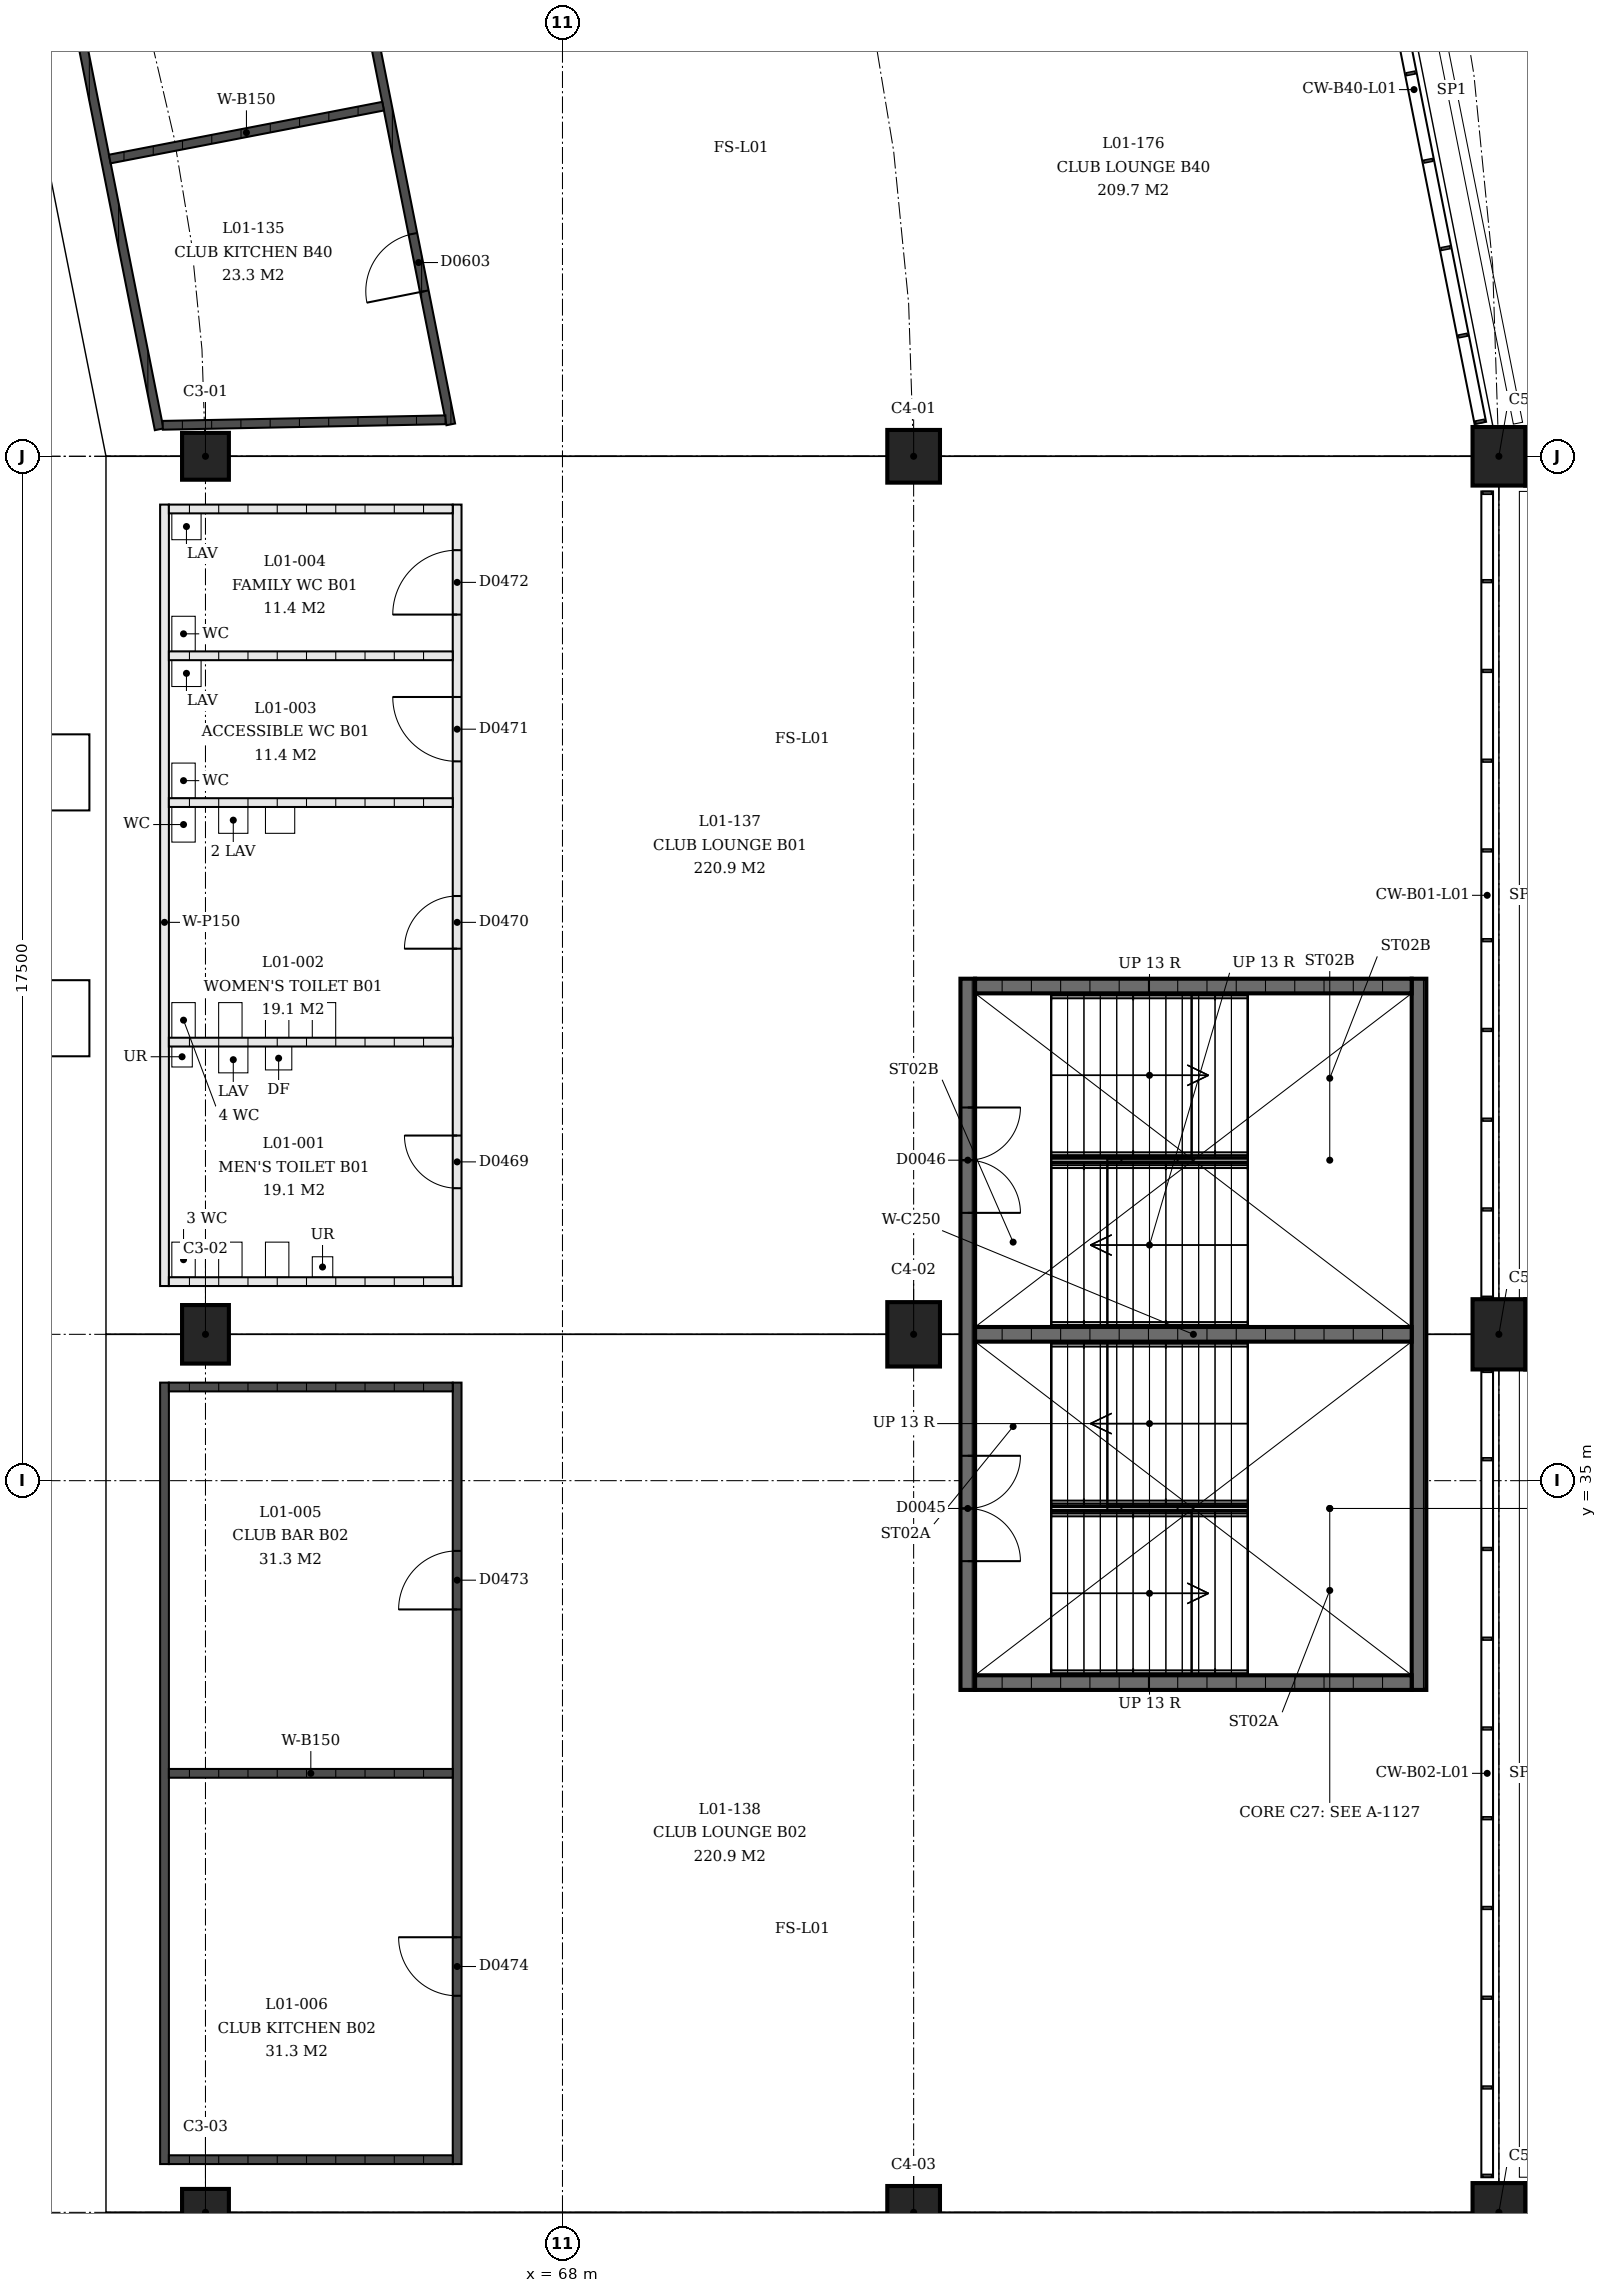
"""IFC4 building model, lengths in metres.
Left out: names, types, materials, properties, quantities, classifications, styles, units other than length and angle.
Written with IfcOpenShell. Run it as: python <this file> out.ifc"""

import sys

from ifc_helpers import new_model, si_unit, direction, frame, frame_2d, origin, origin_2d, place, context, subcontext, project, spatial, rectangle, extrude, element, fill, save


model = new_model("IFC4")
c1 = context("Model", 3, precision=1e-05, world=origin(), true_north=direction((0.0, 1.0)))
c2 = subcontext(c1, "Body", "Model", "MODEL_VIEW")
j1 = project(units=[si_unit("LENGTHUNIT", "METRE"), si_unit("PLANEANGLEUNIT", "RADIAN")], contexts=[c1])
p1 = place(None, origin())
s1 = spatial("IfcSite", under=j1, at=p1, CompositionType="ELEMENT")
p2 = place(p1, origin())
s2 = spatial("IfcBuilding", under=s1, at=p2, CompositionType="ELEMENT")
p3 = place(p2, frame((0.0, 0.0, 4.5)))
s3 = spatial("IfcBuildingStorey", under=s2, at=p3, CompositionType="ELEMENT", Elevation=4.5)
p4 = place(p3, frame((61.9, 52.5, 0.0), z_axis=(0.0, 0.0, 1.0), x_axis=(0.0, 1.0, 0.0)))
e1 = element("IfcColumn", 1, at=p4, inside=s3, PredefinedType="COLUMN", context=c2, shape_type="SweptSolid", body=[
    extrude(rectangle(XDim=0.8, YDim=0.8, at=origin_2d()), origin(), (0.0, 0.0, 1.0), 4.5),
])
p5 = place(p3, frame((74.0, 52.5, 0.0), z_axis=(0.0, 0.0, 1.0), x_axis=(0.0, 1.0, 0.0)))
e2 = element("IfcColumn", 2, at=p5, inside=s3, PredefinedType="COLUMN", context=c2, shape_type="SweptSolid", body=[
    extrude(rectangle(XDim=0.9, YDim=0.9, at=origin_2d()), origin(), (0.0, 0.0, 1.0), 4.5),
])
p6 = place(p3, frame((84.0, 52.5, 0.0), z_axis=(0.0, 0.0, 1.0), x_axis=(0.0, 1.0, 0.0)))
e3 = element("IfcColumn", 3, at=p6, inside=s3, PredefinedType="COLUMN", context=c2, shape_type="SweptSolid", body=[
    extrude(rectangle(XDim=1.0, YDim=0.9, at=origin_2d()), origin(), (0.0, 0.0, 1.0), 4.5),
])
p7 = place(p3, frame((61.9, 37.5, 0.0), z_axis=(0.0, 0.0, 1.0), x_axis=(0.0, 1.0, 0.0)))
e4 = element("IfcColumn", 4, at=p7, inside=s3, PredefinedType="COLUMN", context=c2, shape_type="SweptSolid", body=[
    extrude(rectangle(XDim=1.0, YDim=0.8, at=origin_2d()), origin(), (0.0, 0.0, 1.0), 4.5),
])
p8 = place(p3, frame((74.0, 37.5, 0.0), z_axis=(0.0, 0.0, 1.0), x_axis=(0.0, 1.0, 0.0)))
e5 = element("IfcColumn", 5, at=p8, inside=s3, PredefinedType="COLUMN", context=c2, shape_type="SweptSolid", body=[
    extrude(rectangle(XDim=1.1, YDim=0.9, at=origin_2d()), origin(), (0.0, 0.0, 1.0), 4.5),
])
p9 = place(p3, frame((84.0, 37.5, 0.0), z_axis=(0.0, 0.0, 1.0), x_axis=(0.0, 1.0, 0.0)))
e6 = element("IfcColumn", 6, at=p9, inside=s3, PredefinedType="COLUMN", context=c2, shape_type="SweptSolid", body=[
    extrude(rectangle(XDim=1.2, YDim=0.9, at=origin_2d()), origin(), (0.0, 0.0, 1.0), 4.5),
])
p10 = place(p3, frame((61.9, 22.5, 0.0), z_axis=(0.0, 0.0, 1.0), x_axis=(0.0, 1.0, 0.0)))
e7 = element("IfcColumn", 7, at=p10, inside=s3, PredefinedType="COLUMN", context=c2, shape_type="SweptSolid", body=[
    extrude(rectangle(XDim=0.8, YDim=0.8, at=origin_2d()), origin(), (0.0, 0.0, 1.0), 4.5),
])
p11 = place(p3, frame((74.0, 22.5, 0.0), z_axis=(0.0, 0.0, 1.0), x_axis=(0.0, 1.0, 0.0)))
e8 = element("IfcColumn", 8, at=p11, inside=s3, PredefinedType="COLUMN", context=c2, shape_type="SweptSolid", body=[
    extrude(rectangle(XDim=0.9, YDim=0.9, at=origin_2d()), origin(), (0.0, 0.0, 1.0), 4.5),
])
p12 = place(p3, frame((84.0, 22.5, 0.0), z_axis=(0.0, 0.0, 1.0), x_axis=(0.0, 1.0, 0.0)))
e9 = element("IfcColumn", 9, at=p12, inside=s3, PredefinedType="COLUMN", context=c2, shape_type="SweptSolid", body=[
    extrude(rectangle(XDim=1.0, YDim=0.9, at=origin_2d()), origin(), (0.0, 0.0, 1.0), 4.5),
])
p13 = place(p3, frame((74.925, 31.425, 0.0), z_axis=(0.0, 0.0, 1.0), x_axis=(0.0, 1.0, 0.0)))
e10 = element("IfcWall", 10, at=p13, inside=s3, PredefinedType="SHEAR", context=c2, shape_type="SweptSolid", body=[
    extrude(rectangle(XDim=12.15, YDim=0.25, at=frame_2d((6.075, 0.0))), origin(), (0.0, 0.0, 1.0), 4.09),
])
p14 = place(p13, frame((2.2, 0.0, 0.0)))
e11 = element("IfcOpeningElement", 11, at=p14, cuts=e10, PredefinedType="OPENING", context=c2, shape_type="SweptSolid", body=[
    extrude(rectangle(XDim=1.8, YDim=2.1, at=frame_2d((0.9, 1.05))), frame((0.0, 0.125, 0.0), z_axis=(0.0, -1.0, 0.0), x_axis=(1.0, 0.0, 0.0)), (0.0, 0.0, 1.0), 0.25),
])
p15 = place(p13, frame((8.15, 0.0, 0.0)))
e12 = element("IfcOpeningElement", 12, at=p15, cuts=e10, PredefinedType="OPENING", context=c2, shape_type="SweptSolid", body=[
    extrude(rectangle(XDim=1.8, YDim=2.1, at=frame_2d((0.9, 1.05))), frame((0.0, 0.125, 0.0), z_axis=(0.0, -1.0, 0.0), x_axis=(1.0, 0.0, 0.0)), (0.0, 0.0, 1.0), 0.25),
])
p16 = place(p3, frame((82.635, 31.425, 0.0), z_axis=(0.0, 0.0, 1.0), x_axis=(0.0, 1.0, 0.0)))
e13 = element("IfcWall", 13, at=p16, inside=s3, PredefinedType="SHEAR", context=c2, shape_type="SweptSolid", body=[
    extrude(rectangle(XDim=12.15, YDim=0.25, at=frame_2d((6.075, 0.0))), origin(), (0.0, 0.0, 1.0), 4.09),
])
for number, where, z_axis, x_axis in (
    (14, (75.05, 31.55, 0.0), (0.0, 0.0, 1.0), (1.0, 0.0, 0.0)),
    (15, (75.05, 43.45, 0.0), (0.0, 0.0, 1.0), (1.0, 0.0, 0.0)),
    (16, (75.05, 37.5, 0.0), (0.0, 0.0, 1.0), (1.0, 0.0, 0.0)),
):
    element("IfcWall", number, at=place(p3, frame(where, z_axis=z_axis, x_axis=x_axis)), inside=s3, PredefinedType="SHEAR", context=c2, shape_type="SweptSolid", body=[
        extrude(rectangle(XDim=7.46, YDim=0.25, at=frame_2d((3.73, 0.0))), origin(), (0.0, 0.0, 1.0), 4.09),
    ])
p17 = place(p3, frame((61.2, 38.325, 0.0), z_axis=(0.0, 0.0, 1.0), x_axis=(0.0, 1.0, 0.0)))
e17 = element("IfcWall", 17, at=p17, inside=s3, PredefinedType="PARTITIONING", context=c2, shape_type="SweptSolid", body=[
    extrude(rectangle(XDim=13.35, YDim=0.15, at=frame_2d((6.675, 0.0))), origin(), (0.0, 0.0, 1.0), 3.0),
])
p18 = place(p3, frame((66.2, 38.325, 0.0), z_axis=(0.0, 0.0, 1.0), x_axis=(0.0, 1.0, 0.0)))
e18 = element("IfcWall", 18, at=p18, inside=s3, PredefinedType="PARTITIONING", context=c2, shape_type="SweptSolid", body=[
    extrude(rectangle(XDim=13.35, YDim=0.15, at=frame_2d((6.675, 0.0))), origin(), (0.0, 0.0, 1.0), 3.0),
])
p19 = place(p18, frame((1.671, 0.0, 0.0)))
e19 = element("IfcOpeningElement", 19, at=p19, cuts=e18, PredefinedType="OPENING", context=c2, shape_type="SweptSolid", body=[
    extrude(rectangle(XDim=0.9, YDim=2.1, at=frame_2d((0.45, 1.05))), frame((0.0, 0.075, 0.0), z_axis=(0.0, -1.0, 0.0), x_axis=(1.0, 0.0, 0.0)), (0.0, 0.0, 1.0), 0.15),
])
p20 = place(p18, frame((5.763, 0.0, 0.0)))
e20 = element("IfcOpeningElement", 20, at=p20, cuts=e18, PredefinedType="OPENING", context=c2, shape_type="SweptSolid", body=[
    extrude(rectangle(XDim=0.9, YDim=2.1, at=frame_2d((0.45, 1.05))), frame((0.0, 0.075, 0.0), z_axis=(0.0, -1.0, 0.0), x_axis=(1.0, 0.0, 0.0)), (0.0, 0.0, 1.0), 0.15),
])
p21 = place(p18, frame((8.963, 0.0, 0.0)))
e21 = element("IfcOpeningElement", 21, at=p21, cuts=e18, PredefinedType="OPENING", context=c2, shape_type="SweptSolid", body=[
    extrude(rectangle(XDim=1.1, YDim=2.1, at=frame_2d((0.55, 1.05))), frame((0.0, 0.075, 0.0), z_axis=(0.0, -1.0, 0.0), x_axis=(1.0, 0.0, 0.0)), (0.0, 0.0, 1.0), 0.15),
])
p22 = place(p18, frame((11.471, 0.0, 0.0)))
e22 = element("IfcOpeningElement", 22, at=p22, cuts=e18, PredefinedType="OPENING", context=c2, shape_type="SweptSolid", body=[
    extrude(rectangle(XDim=1.1, YDim=2.1, at=frame_2d((0.55, 1.05))), frame((0.0, 0.075, 0.0), z_axis=(0.0, -1.0, 0.0), x_axis=(1.0, 0.0, 0.0)), (0.0, 0.0, 1.0), 0.15),
])
for number, where, z_axis, x_axis in (
    (23, (61.275, 38.4, 0.0), (0.0, 0.0, 1.0), (1.0, 0.0, 0.0)),
    (24, (61.275, 42.492, 0.0), (0.0, 0.0, 1.0), (1.0, 0.0, 0.0)),
    (25, (61.275, 46.584, 0.0), (0.0, 0.0, 1.0), (1.0, 0.0, 0.0)),
    (26, (61.275, 49.092, 0.0), (0.0, 0.0, 1.0), (1.0, 0.0, 0.0)),
    (27, (61.275, 51.6, 0.0), (0.0, 0.0, 1.0), (1.0, 0.0, 0.0)),
):
    element("IfcWall", number, at=place(p3, frame(where, z_axis=z_axis, x_axis=x_axis)), inside=s3, PredefinedType="PARTITIONING", context=c2, shape_type="SweptSolid", body=[
        extrude(rectangle(XDim=4.85, YDim=0.15, at=frame_2d((2.425, 0.0))), origin(), (0.0, 0.0, 1.0), 3.0),
    ])
p23 = place(p3, frame((61.2, 36.675, 0.0), z_axis=(0.0, 0.0, 1.0), x_axis=(0.0, -1.0, 0.0)))
e28 = element("IfcWall", 28, at=p23, inside=s3, PredefinedType="SOLIDWALL", context=c2, shape_type="SweptSolid", body=[
    extrude(rectangle(XDim=13.35, YDim=0.15, at=frame_2d((6.675, 0.0))), origin(), (0.0, 0.0, 1.0), 3.0),
])
p24 = place(p3, frame((66.2, 36.675, 0.0), z_axis=(0.0, 0.0, 1.0), x_axis=(0.0, -1.0, 0.0)))
e29 = element("IfcWall", 29, at=p24, inside=s3, PredefinedType="SOLIDWALL", context=c2, shape_type="SweptSolid", body=[
    extrude(rectangle(XDim=13.35, YDim=0.15, at=frame_2d((6.675, 0.0))), origin(), (0.0, 0.0, 1.0), 3.0),
])
p25 = place(p24, frame((2.875, 0.0, 0.0)))
e30 = element("IfcOpeningElement", 30, at=p25, cuts=e29, PredefinedType="OPENING", context=c2, shape_type="SweptSolid", body=[
    extrude(rectangle(XDim=1.0, YDim=2.1, at=frame_2d((0.5, 1.05))), frame((0.0, 0.075, 0.0), z_axis=(0.0, -1.0, 0.0), x_axis=(1.0, 0.0, 0.0)), (0.0, 0.0, 1.0), 0.15),
])
p26 = place(p24, frame((9.475, 0.0, 0.0)))
e31 = element("IfcOpeningElement", 31, at=p26, cuts=e29, PredefinedType="OPENING", context=c2, shape_type="SweptSolid", body=[
    extrude(rectangle(XDim=1.0, YDim=2.1, at=frame_2d((0.5, 1.05))), frame((0.0, 0.075, 0.0), z_axis=(0.0, -1.0, 0.0), x_axis=(1.0, 0.0, 0.0)), (0.0, 0.0, 1.0), 0.15),
])
for number, where, z_axis, x_axis in (
    (32, (61.275, 36.6, 0.0), (0.0, 0.0, 1.0), (1.0, 0.0, 0.0)),
    (33, (61.275, 30.0, 0.0), (0.0, 0.0, 1.0), (1.0, 0.0, 0.0)),
    (34, (61.275, 23.4, 0.0), (0.0, 0.0, 1.0), (1.0, 0.0, 0.0)),
):
    element("IfcWall", number, at=place(p3, frame(where, z_axis=z_axis, x_axis=x_axis)), inside=s3, PredefinedType="SOLIDWALL", context=c2, shape_type="SweptSolid", body=[
        extrude(rectangle(XDim=4.85, YDim=0.15, at=frame_2d((2.425, 0.0))), origin(), (0.0, 0.0, 1.0), 3.0),
    ])
p27 = place(p3, frame((59.277, 62.168, 0.0), z_axis=(0.0, 0.0, 1.0), x_axis=(0.195100776204, -0.980783200878, 0.0)))
e35 = element("IfcWall", 35, at=p27, inside=s3, PredefinedType="SOLIDWALL", context=c2, shape_type="SweptSolid", body=[
    extrude(rectangle(XDim=9.388, YDim=0.15, at=frame_2d((4.694, 0.0))), origin(), (0.0, 0.0, 1.0), 3.0),
])
p28 = place(p3, frame((63.923, 63.945, 0.0), z_axis=(0.0, 0.0, 1.0), x_axis=(0.195102100298, -0.980782937484, 0.0)))
e36 = element("IfcWall", 36, at=p28, inside=s3, PredefinedType="SOLIDWALL", context=c2, shape_type="SweptSolid", body=[
    extrude(rectangle(XDim=11.113, YDim=0.15, at=frame_2d((5.557, 0.0))), origin(), (0.0, 0.0, 1.0), 3.0),
])
p29 = place(p28, frame((2.319, 0.0, 0.0)))
e37 = element("IfcOpeningElement", 37, at=p29, cuts=e36, PredefinedType="OPENING", context=c2, shape_type="SweptSolid", body=[
    extrude(rectangle(XDim=1.0, YDim=2.1, at=frame_2d((0.5, 1.05))), frame((0.0, 0.075, 0.0), z_axis=(0.0, -1.0, 0.0), x_axis=(1.0, 0.0, 0.0)), (0.0, 0.0, 1.0), 0.15),
])
p30 = place(p28, frame((7.794, 0.0, 0.0)))
e38 = element("IfcOpeningElement", 38, at=p30, cuts=e36, PredefinedType="OPENING", context=c2, shape_type="SweptSolid", body=[
    extrude(rectangle(XDim=1.0, YDim=2.1, at=frame_2d((0.5, 1.05))), frame((0.0, 0.075, 0.0), z_axis=(0.0, -1.0, 0.0), x_axis=(1.0, 0.0, 0.0)), (0.0, 0.0, 1.0), 0.15),
])
p31 = place(p3, frame((60.265, 57.578, 0.0), z_axis=(0.0, 0.0, 1.0), x_axis=(0.981823683867, 0.189795294456, 0.0)))
e39 = element("IfcWall", 39, at=p31, inside=s3, PredefinedType="SOLIDWALL", context=c2, shape_type="SweptSolid", body=[
    extrude(rectangle(XDim=4.757, YDim=0.15, at=frame_2d((2.378, 0.0))), origin(), (0.0, 0.0, 1.0), 3.0),
])
p32 = place(p3, frame((61.17, 53.03, 0.0), z_axis=(0.0, 0.0, 1.0), x_axis=(0.999810800275, 0.01945157199, 0.0)))
e40 = element("IfcWall", 40, at=p32, inside=s3, PredefinedType="SOLIDWALL", context=c2, shape_type="SweptSolid", body=[
    extrude(rectangle(XDim=4.832, YDim=0.15, at=frame_2d((2.416, 0.0))), origin(), (0.0, 0.0, 1.0), 3.0),
])
p33 = place(p14, origin())
e41 = element("IfcDoor", 41, at=p33, inside=s3, OperationType="DOUBLE_DOOR_SINGLE_SWING", PredefinedType="DOOR", context=c2, shape_type="SweptSolid", body=[
    extrude(rectangle(XDim=1.8, YDim=2.1, at=frame_2d((0.9, 1.05))), frame((0.0, 0.025, 0.0), z_axis=(0.0, -1.0, 0.0), x_axis=(1.0, 0.0, 0.0)), (0.0, 0.0, 1.0), 0.05),
])
fill(e11, e41)
p34 = place(p15, origin())
e42 = element("IfcDoor", 42, at=p34, inside=s3, OperationType="DOUBLE_DOOR_SINGLE_SWING", PredefinedType="DOOR", context=c2, shape_type="SweptSolid", body=[
    extrude(rectangle(XDim=1.8, YDim=2.1, at=frame_2d((0.9, 1.05))), frame((0.0, 0.025, 0.0), z_axis=(0.0, -1.0, 0.0), x_axis=(1.0, 0.0, 0.0)), (0.0, 0.0, 1.0), 0.05),
])
fill(e12, e42)
p35 = place(p19, origin())
e43 = element("IfcDoor", 43, at=p35, inside=s3, OperationType="SINGLE_SWING_LEFT", PredefinedType="DOOR", context=c2, shape_type="SweptSolid", body=[
    extrude(rectangle(XDim=0.9, YDim=2.1, at=frame_2d((0.45, 1.05))), frame((0.0, 0.025, 0.0), z_axis=(0.0, -1.0, 0.0), x_axis=(1.0, 0.0, 0.0)), (0.0, 0.0, 1.0), 0.05),
])
fill(e19, e43)
p36 = place(p20, origin())
e44 = element("IfcDoor", 44, at=p36, inside=s3, OperationType="SINGLE_SWING_RIGHT", PredefinedType="DOOR", context=c2, shape_type="SweptSolid", body=[
    extrude(rectangle(XDim=0.9, YDim=2.1, at=frame_2d((0.45, 1.05))), frame((0.0, 0.025, 0.0), z_axis=(0.0, -1.0, 0.0), x_axis=(1.0, 0.0, 0.0)), (0.0, 0.0, 1.0), 0.05),
])
fill(e20, e44)
p37 = place(p21, origin())
e45 = element("IfcDoor", 45, at=p37, inside=s3, OperationType="SINGLE_SWING_LEFT", PredefinedType="DOOR", context=c2, shape_type="SweptSolid", body=[
    extrude(rectangle(XDim=1.1, YDim=2.1, at=frame_2d((0.55, 1.05))), frame((0.0, 0.025, 0.0), z_axis=(0.0, -1.0, 0.0), x_axis=(1.0, 0.0, 0.0)), (0.0, 0.0, 1.0), 0.05),
])
fill(e21, e45)
p38 = place(p22, origin())
e46 = element("IfcDoor", 46, at=p38, inside=s3, OperationType="SINGLE_SWING_RIGHT", PredefinedType="DOOR", context=c2, shape_type="SweptSolid", body=[
    extrude(rectangle(XDim=1.1, YDim=2.1, at=frame_2d((0.55, 1.05))), frame((0.0, 0.025, 0.0), z_axis=(0.0, -1.0, 0.0), x_axis=(1.0, 0.0, 0.0)), (0.0, 0.0, 1.0), 0.05),
])
fill(e22, e46)
p39 = place(p25, origin())
e47 = element("IfcDoor", 47, at=p39, inside=s3, OperationType="SINGLE_SWING_RIGHT", PredefinedType="DOOR", context=c2, shape_type="SweptSolid", body=[
    extrude(rectangle(XDim=1.0, YDim=2.1, at=frame_2d((0.5, 1.05))), frame((0.0, 0.025, 0.0), z_axis=(0.0, -1.0, 0.0), x_axis=(1.0, 0.0, 0.0)), (0.0, 0.0, 1.0), 0.05),
])
fill(e30, e47)
p40 = place(p26, origin())
e48 = element("IfcDoor", 48, at=p40, inside=s3, OperationType="SINGLE_SWING_LEFT", PredefinedType="DOOR", context=c2, shape_type="SweptSolid", body=[
    extrude(rectangle(XDim=1.0, YDim=2.1, at=frame_2d((0.5, 1.05))), frame((0.0, 0.025, 0.0), z_axis=(0.0, -1.0, 0.0), x_axis=(1.0, 0.0, 0.0)), (0.0, 0.0, 1.0), 0.05),
])
fill(e31, e48)
p41 = place(p30, origin())
e49 = element("IfcDoor", 49, at=p41, inside=s3, OperationType="SINGLE_SWING_RIGHT", PredefinedType="DOOR", context=c2, shape_type="SweptSolid", body=[
    extrude(rectangle(XDim=1.0, YDim=2.1, at=frame_2d((0.5, 1.05))), frame((0.0, 0.025, 0.0), z_axis=(0.0, -1.0, 0.0), x_axis=(1.0, 0.0, 0.0)), (0.0, 0.0, 1.0), 0.05),
])
fill(e38, e49)
save(model, sys.argv[1])
